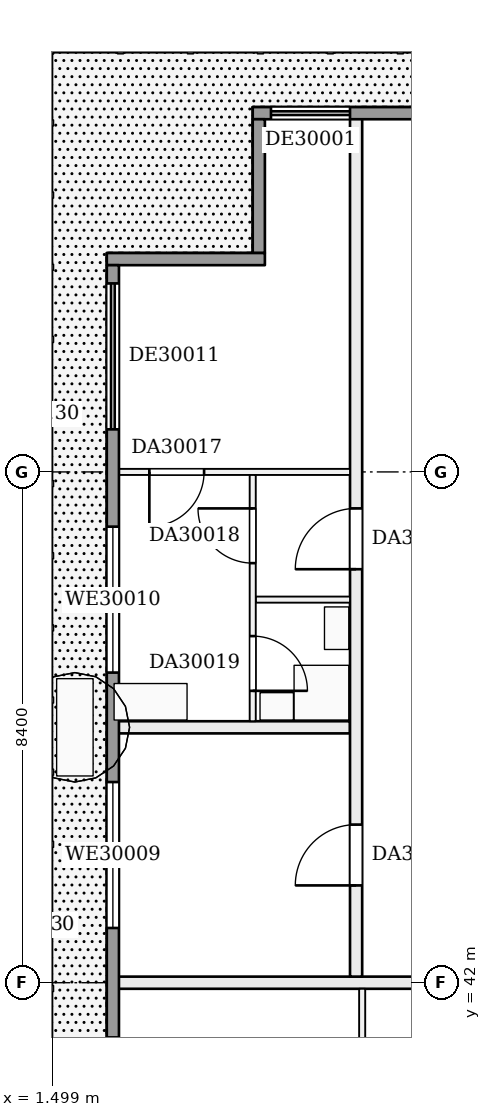
"""IFC4 building model, lengths in metres.
Left out: names, types, materials, properties, quantities, classifications, styles, units other than length and angle.
Written with IfcOpenShell. Run it as: python <this file> out.ifc"""

import sys

from ifc_helpers import new_model, si_unit, direction, frame, frame_2d, origin, place, context, subcontext, project, spatial, rectangle, extrude, element, fill, save


model = new_model("IFC4")
c1 = context("Model", 3, precision=1e-05, world=origin(), true_north=direction((0.0, 1.0)))
c2 = subcontext(c1, "Body", "Model", "MODEL_VIEW")
j1 = project(units=[si_unit("LENGTHUNIT", "METRE"), si_unit("PLANEANGLEUNIT", "RADIAN")], contexts=[c1])
p1 = place(None, origin())
s1 = spatial("IfcSite", under=j1, at=p1, CompositionType="ELEMENT")
p2 = place(p1, origin())
s2 = spatial("IfcBuilding", under=s1, at=p2, CompositionType="ELEMENT")
p3 = place(p2, frame((0.0, 0.0, 119.7)))
s3 = spatial("IfcBuildingStorey", under=s2, at=p3, CompositionType="ELEMENT", Elevation=119.7)
p4 = place(p3, frame((2.5, 42.0, 0.0), z_axis=(0.0, 0.0, 1.0), x_axis=(1.0, 0.0, 0.0)))
e1 = element("IfcWall", 1, at=p4, inside=s3, PredefinedType="PARTITIONING", context=c2, shape_type="SweptSolid", body=[
    extrude(rectangle(XDim=5.9, YDim=0.2, at=frame_2d((2.95, 0.0))), origin(), (0.0, 0.0, 1.0), 3.22),
])
p5 = place(p3, frame((2.5, 46.2, 0.0), z_axis=(0.0, 0.0, 1.0), x_axis=(1.0, 0.0, 0.0)))
e2 = element("IfcWall", 2, at=p5, inside=s3, PredefinedType="PARTITIONING", context=c2, shape_type="SweptSolid", body=[
    extrude(rectangle(XDim=3.9, YDim=0.2, at=frame_2d((1.95, 0.0))), origin(), (0.0, 0.0, 1.0), 3.22),
])
p6 = place(p3, frame((4.85, 48.3, 0.0), z_axis=(0.0, 0.0, 1.0), x_axis=(1.0, 0.0, 0.0)))
e3 = element("IfcWall", 3, at=p6, inside=s3, PredefinedType="PARTITIONING", context=c2, shape_type="SweptSolid", body=[
    extrude(rectangle(XDim=1.55, YDim=0.1, at=frame_2d((0.775, 0.0))), origin(), (0.0, 0.0, 1.0), 3.22),
])
p7 = place(p3, frame((2.5, 50.4, 0.0), z_axis=(0.0, 0.0, 1.0), x_axis=(1.0, 0.0, 0.0)))
e4 = element("IfcWall", 4, at=p7, inside=s3, PredefinedType="PARTITIONING", context=c2, shape_type="SweptSolid", body=[
    extrude(rectangle(XDim=3.9, YDim=0.1, at=frame_2d((1.95, 0.0))), origin(), (0.0, 0.0, 1.0), 3.22),
])
p8 = place(p7, frame((0.6, 0.0, 0.0)))
e5 = element("IfcOpeningElement", 5, at=p8, cuts=e4, PredefinedType="OPENING", context=c2, shape_type="SweptSolid", body=[
    extrude(rectangle(XDim=0.9, YDim=2.1, at=frame_2d((0.45, 1.05))), frame((0.0, 0.06, 0.0), z_axis=(0.0, -1.0, 0.0), x_axis=(1.0, 0.0, 0.0)), (0.0, 0.0, 1.0), 0.12),
])
p9 = place(p3, frame((4.8, 46.3, 0.0), z_axis=(0.0, 0.0, 1.0), x_axis=(0.0, 1.0, 0.0)))
e6 = element("IfcWall", 6, at=p9, inside=s3, PredefinedType="PARTITIONING", context=c2, shape_type="SweptSolid", body=[
    extrude(rectangle(XDim=4.05, YDim=0.1, at=frame_2d((2.025, 0.0))), origin(), (0.0, 0.0, 1.0), 3.22),
])
p10 = place(p9, frame((2.6, 0.0, 0.0)))
e7 = element("IfcOpeningElement", 7, at=p10, cuts=e6, PredefinedType="OPENING", context=c2, shape_type="SweptSolid", body=[
    extrude(rectangle(XDim=0.9, YDim=2.1, at=frame_2d((0.45, 1.05))), frame((0.0, 0.06, 0.0), z_axis=(0.0, -1.0, 0.0), x_axis=(1.0, 0.0, 0.0)), (0.0, 0.0, 1.0), 0.12),
])
p11 = place(p9, frame((0.5, 0.0, 0.0)))
e8 = element("IfcOpeningElement", 8, at=p11, cuts=e6, PredefinedType="OPENING", context=c2, shape_type="SweptSolid", body=[
    extrude(rectangle(XDim=0.9, YDim=2.1, at=frame_2d((0.45, 1.05))), frame((0.0, 0.06, 0.0), z_axis=(0.0, -1.0, 0.0), x_axis=(1.0, 0.0, 0.0)), (0.0, 0.0, 1.0), 0.12),
])
p12 = place(p3, frame((6.5, 42.1, 0.0), z_axis=(0.0, 0.0, 1.0), x_axis=(0.0, 1.0, 0.0)))
e9 = element("IfcWall", 9, at=p12, inside=s3, PredefinedType="PARTITIONING", context=c2, shape_type="SweptSolid", body=[
    extrude(rectangle(XDim=14.2, YDim=0.2, at=frame_2d((7.1, 0.0))), origin(), (0.0, 0.0, 1.0), 3.22),
])
p13 = place(p12, frame((1.5, 0.0, 0.0)))
e10 = element("IfcOpeningElement", 10, at=p13, cuts=e9, PredefinedType="OPENING", context=c2, shape_type="SweptSolid", body=[
    extrude(rectangle(XDim=1.0, YDim=2.1, at=frame_2d((0.5, 1.05))), frame((0.0, 0.11, 0.0), z_axis=(0.0, -1.0, 0.0), x_axis=(1.0, 0.0, 0.0)), (0.0, 0.0, 1.0), 0.22),
])
p14 = place(p12, frame((6.7, 0.0, 0.0)))
e11 = element("IfcOpeningElement", 11, at=p14, cuts=e9, PredefinedType="OPENING", context=c2, shape_type="SweptSolid", body=[
    extrude(rectangle(XDim=1.0, YDim=2.1, at=frame_2d((0.5, 1.05))), frame((0.0, 0.11, 0.0), z_axis=(0.0, -1.0, 0.0), x_axis=(1.0, 0.0, 0.0)), (0.0, 0.0, 1.0), 0.22),
])
p15 = place(p3, frame((6.6, 16.85, 0.0), z_axis=(0.0, 0.0, 1.0), x_axis=(0.0, 1.0, 0.0)))
e12 = element("IfcWall", 12, at=p15, inside=s3, PredefinedType="PARTITIONING", context=c2, shape_type="SweptSolid", body=[
    extrude(rectangle(XDim=25.05, YDim=0.1, at=frame_2d((12.525, 0.0))), origin(), (0.0, 0.0, 1.0), 3.22),
])
p16 = place(p15, frame((1.55, 0.0, 0.0)))
e13 = element("IfcOpeningElement", 13, at=p16, cuts=e12, PredefinedType="OPENING", context=c2, shape_type="SweptSolid", body=[
    extrude(rectangle(XDim=0.9, YDim=2.1, at=frame_2d((0.45, 1.05))), frame((0.0, 0.06, 0.0), z_axis=(0.0, -1.0, 0.0), x_axis=(1.0, 0.0, 0.0)), (0.0, 0.0, 1.0), 0.12),
])
p17 = place(p15, frame((7.15, 0.0, 0.0)))
e14 = element("IfcOpeningElement", 14, at=p17, cuts=e12, PredefinedType="OPENING", context=c2, shape_type="SweptSolid", body=[
    extrude(rectangle(XDim=0.9, YDim=2.1, at=frame_2d((0.45, 1.05))), frame((0.0, 0.06, 0.0), z_axis=(0.0, -1.0, 0.0), x_axis=(1.0, 0.0, 0.0)), (0.0, 0.0, 1.0), 0.12),
])
p18 = place(p15, frame((14.15, 0.0, 0.0)))
e15 = element("IfcOpeningElement", 15, at=p18, cuts=e12, PredefinedType="OPENING", context=c2, shape_type="SweptSolid", body=[
    extrude(rectangle(XDim=0.9, YDim=2.1, at=frame_2d((0.45, 1.05))), frame((0.0, 0.06, 0.0), z_axis=(0.0, -1.0, 0.0), x_axis=(1.0, 0.0, 0.0)), (0.0, 0.0, 1.0), 0.12),
])
p19 = place(p15, frame((18.35, 0.0, 0.0)))
e16 = element("IfcOpeningElement", 16, at=p19, cuts=e12, PredefinedType="OPENING", context=c2, shape_type="SweptSolid", body=[
    extrude(rectangle(XDim=0.9, YDim=2.1, at=frame_2d((0.45, 1.05))), frame((0.0, 0.06, 0.0), z_axis=(0.0, -1.0, 0.0), x_axis=(1.0, 0.0, 0.0)), (0.0, 0.0, 1.0), 0.12),
])
p20 = place(p15, frame((22.55, 0.0, 0.0)))
e17 = element("IfcOpeningElement", 17, at=p20, cuts=e12, PredefinedType="OPENING", context=c2, shape_type="SweptSolid", body=[
    extrude(rectangle(XDim=0.9, YDim=2.1, at=frame_2d((0.45, 1.05))), frame((0.0, 0.06, 0.0), z_axis=(0.0, -1.0, 0.0), x_axis=(1.0, 0.0, 0.0)), (0.0, 0.0, 1.0), 0.12),
])
p21 = place(p3, frame((8.4, 56.3, 0.0), z_axis=(0.0, 0.0, 1.0), x_axis=(-1.0, 0.0, 0.0)))
e18 = element("IfcWall", 18, at=p21, inside=s3, PredefinedType="SOLIDWALL", context=c2, shape_type="SweptSolid", body=[
    extrude(rectangle(XDim=3.6, YDim=0.2, at=frame_2d((1.8, 0.0))), origin(), (0.0, 0.0, 1.0), 3.22),
])
p22 = place(p21, frame((2.0, 0.0, 0.0)))
e19 = element("IfcOpeningElement", 19, at=p22, cuts=e18, PredefinedType="OPENING", context=c2, shape_type="SweptSolid", body=[
    extrude(rectangle(XDim=1.3, YDim=2.2, at=frame_2d((0.65, 1.1))), frame((0.0, 0.11, 0.0), z_axis=(0.0, -1.0, 0.0), x_axis=(1.0, 0.0, 0.0)), (0.0, 0.0, 1.0), 0.22),
])
p23 = place(p3, frame((4.9, 56.2, 0.0), z_axis=(0.0, 0.0, 1.0), x_axis=(0.0, -1.0, 0.0)))
e20 = element("IfcWall", 20, at=p23, inside=s3, PredefinedType="SOLIDWALL", context=c2, shape_type="SweptSolid", body=[
    extrude(rectangle(XDim=2.2, YDim=0.2, at=frame_2d((1.1, 0.0))), origin(), (0.0, 0.0, 1.0), 3.22),
])
p24 = place(p3, frame((5.0, 53.9, 0.0), z_axis=(0.0, 0.0, 1.0), x_axis=(-1.0, 0.0, 0.0)))
e21 = element("IfcWall", 21, at=p24, inside=s3, PredefinedType="SOLIDWALL", context=c2, shape_type="SweptSolid", body=[
    extrude(rectangle(XDim=2.6, YDim=0.2, at=frame_2d((1.3, 0.0))), origin(), (0.0, 0.0, 1.0), 3.22),
])
p25 = place(p3, frame((2.5, 53.8, 0.0), z_axis=(0.0, 0.0, 1.0), x_axis=(0.0, -1.0, 0.0)))
e22 = element("IfcWall", 22, at=p25, inside=s3, PredefinedType="SOLIDWALL", context=c2, shape_type="SweptSolid", body=[
    extrude(rectangle(XDim=40.4, YDim=0.2, at=frame_2d((20.2, 0.0))), origin(), (0.0, 0.0, 1.0), 3.22),
])
p26 = place(p25, frame((37.7, 0.0, 0.9)))
e23 = element("IfcOpeningElement", 23, at=p26, cuts=e22, PredefinedType="OPENING", context=c2, shape_type="SweptSolid", body=[
    extrude(rectangle(XDim=2.4, YDim=1.5, at=frame_2d((1.2, 0.75))), frame((0.0, 0.11, 0.0), z_axis=(0.0, -1.0, 0.0), x_axis=(1.0, 0.0, 0.0)), (0.0, 0.0, 1.0), 0.22),
])
p27 = place(p25, frame((33.7, 0.0, 0.9)))
e24 = element("IfcOpeningElement", 24, at=p27, cuts=e22, PredefinedType="OPENING", context=c2, shape_type="SweptSolid", body=[
    extrude(rectangle(XDim=2.4, YDim=1.5, at=frame_2d((1.2, 0.75))), frame((0.0, 0.11, 0.0), z_axis=(0.0, -1.0, 0.0), x_axis=(1.0, 0.0, 0.0)), (0.0, 0.0, 1.0), 0.22),
])
p28 = place(p25, frame((29.5, 0.0, 0.0)))
e25 = element("IfcOpeningElement", 25, at=p28, cuts=e22, PredefinedType="OPENING", context=c2, shape_type="SweptSolid", body=[
    extrude(rectangle(XDim=2.4, YDim=2.2, at=frame_2d((1.2, 1.1))), frame((0.0, 0.11, 0.0), z_axis=(0.0, -1.0, 0.0), x_axis=(1.0, 0.0, 0.0)), (0.0, 0.0, 1.0), 0.22),
])
p29 = place(p25, frame((25.3, 0.0, 0.0)))
e26 = element("IfcOpeningElement", 26, at=p29, cuts=e22, PredefinedType="OPENING", context=c2, shape_type="SweptSolid", body=[
    extrude(rectangle(XDim=2.4, YDim=2.2, at=frame_2d((1.2, 1.1))), frame((0.0, 0.11, 0.0), z_axis=(0.0, -1.0, 0.0), x_axis=(1.0, 0.0, 0.0)), (0.0, 0.0, 1.0), 0.22),
])
p30 = place(p25, frame((21.1, 0.0, 0.9)))
e27 = element("IfcOpeningElement", 27, at=p30, cuts=e22, PredefinedType="OPENING", context=c2, shape_type="SweptSolid", body=[
    extrude(rectangle(XDim=2.4, YDim=1.5, at=frame_2d((1.2, 0.75))), frame((0.0, 0.11, 0.0), z_axis=(0.0, -1.0, 0.0), x_axis=(1.0, 0.0, 0.0)), (0.0, 0.0, 1.0), 0.22),
])
p31 = place(p25, frame((16.9, 0.0, 0.9)))
e28 = element("IfcOpeningElement", 28, at=p31, cuts=e22, PredefinedType="OPENING", context=c2, shape_type="SweptSolid", body=[
    extrude(rectangle(XDim=2.4, YDim=1.5, at=frame_2d((1.2, 0.75))), frame((0.0, 0.11, 0.0), z_axis=(0.0, -1.0, 0.0), x_axis=(1.0, 0.0, 0.0)), (0.0, 0.0, 1.0), 0.22),
])
p32 = place(p25, frame((12.7, 0.0, 0.9)))
e29 = element("IfcOpeningElement", 29, at=p32, cuts=e22, PredefinedType="OPENING", context=c2, shape_type="SweptSolid", body=[
    extrude(rectangle(XDim=2.4, YDim=1.5, at=frame_2d((1.2, 0.75))), frame((0.0, 0.11, 0.0), z_axis=(0.0, -1.0, 0.0), x_axis=(1.0, 0.0, 0.0)), (0.0, 0.0, 1.0), 0.22),
])
p33 = place(p25, frame((8.5, 0.0, 0.9)))
e30 = element("IfcOpeningElement", 30, at=p33, cuts=e22, PredefinedType="OPENING", context=c2, shape_type="SweptSolid", body=[
    extrude(rectangle(XDim=2.4, YDim=1.5, at=frame_2d((1.2, 0.75))), frame((0.0, 0.11, 0.0), z_axis=(0.0, -1.0, 0.0), x_axis=(1.0, 0.0, 0.0)), (0.0, 0.0, 1.0), 0.22),
])
p34 = place(p25, frame((4.3, 0.0, 0.9)))
e31 = element("IfcOpeningElement", 31, at=p34, cuts=e22, PredefinedType="OPENING", context=c2, shape_type="SweptSolid", body=[
    extrude(rectangle(XDim=2.4, YDim=1.5, at=frame_2d((1.2, 0.75))), frame((0.0, 0.11, 0.0), z_axis=(0.0, -1.0, 0.0), x_axis=(1.0, 0.0, 0.0)), (0.0, 0.0, 1.0), 0.22),
])
p35 = place(p25, frame((0.3, 0.0, 0.0)))
e32 = element("IfcOpeningElement", 32, at=p35, cuts=e22, PredefinedType="OPENING", context=c2, shape_type="SweptSolid", body=[
    extrude(rectangle(XDim=2.4, YDim=2.2, at=frame_2d((1.2, 1.1))), frame((0.0, 0.11, 0.0), z_axis=(0.0, -1.0, 0.0), x_axis=(1.0, 0.0, 0.0)), (0.0, 0.0, 1.0), 0.22),
])
p36 = place(p8, frame((0.9, 0.0, 0.0), z_axis=(0.0, 0.0, 1.0), x_axis=(-1.0, 0.0, 0.0)))
e33 = element("IfcDoor", 33, at=p36, inside=s3, OperationType="SINGLE_SWING_RIGHT", PredefinedType="DOOR", context=c2, shape_type="SweptSolid", body=[
    extrude(rectangle(XDim=0.9, YDim=2.1, at=frame_2d((0.45, 1.05))), frame((0.0, 0.025, 0.0), z_axis=(0.0, -1.0, 0.0), x_axis=(1.0, 0.0, 0.0)), (0.0, 0.0, 1.0), 0.05),
])
fill(e5, e33)
p37 = place(p10, origin())
e34 = element("IfcDoor", 34, at=p37, inside=s3, OperationType="SINGLE_SWING_RIGHT", PredefinedType="DOOR", context=c2, shape_type="SweptSolid", body=[
    extrude(rectangle(XDim=0.9, YDim=2.1, at=frame_2d((0.45, 1.05))), frame((0.0, 0.025, 0.0), z_axis=(0.0, -1.0, 0.0), x_axis=(1.0, 0.0, 0.0)), (0.0, 0.0, 1.0), 0.05),
])
fill(e7, e34)
p38 = place(p11, frame((0.9, 0.0, 0.0), z_axis=(0.0, 0.0, 1.0), x_axis=(-1.0, 0.0, 0.0)))
e35 = element("IfcDoor", 35, at=p38, inside=s3, OperationType="SINGLE_SWING_RIGHT", PredefinedType="DOOR", context=c2, shape_type="SweptSolid", body=[
    extrude(rectangle(XDim=0.9, YDim=2.1, at=frame_2d((0.45, 1.05))), frame((0.0, 0.025, 0.0), z_axis=(0.0, -1.0, 0.0), x_axis=(1.0, 0.0, 0.0)), (0.0, 0.0, 1.0), 0.05),
])
fill(e8, e35)
p39 = place(p13, origin())
e36 = element("IfcDoor", 36, at=p39, inside=s3, OperationType="SINGLE_SWING_LEFT", PredefinedType="DOOR", context=c2, shape_type="SweptSolid", body=[
    extrude(rectangle(XDim=1.0, YDim=2.1, at=frame_2d((0.5, 1.05))), frame((0.0, 0.025, 0.0), z_axis=(0.0, -1.0, 0.0), x_axis=(1.0, 0.0, 0.0)), (0.0, 0.0, 1.0), 0.05),
])
fill(e10, e36)
p40 = place(p14, origin())
e37 = element("IfcDoor", 37, at=p40, inside=s3, OperationType="SINGLE_SWING_LEFT", PredefinedType="DOOR", context=c2, shape_type="SweptSolid", body=[
    extrude(rectangle(XDim=1.0, YDim=2.1, at=frame_2d((0.5, 1.05))), frame((0.0, 0.025, 0.0), z_axis=(0.0, -1.0, 0.0), x_axis=(1.0, 0.0, 0.0)), (0.0, 0.0, 1.0), 0.05),
])
fill(e11, e37)
p41 = place(p22, origin())
e38 = element("IfcDoor", 38, at=p41, inside=s3, OperationType="DOUBLE_DOOR_SLIDING", PredefinedType="DOOR", context=c2, shape_type="SweptSolid", body=[
    extrude(rectangle(XDim=1.3, YDim=2.2, at=frame_2d((0.65, 1.1))), frame((0.0, 0.025, 0.0), z_axis=(0.0, -1.0, 0.0), x_axis=(1.0, 0.0, 0.0)), (0.0, 0.0, 1.0), 0.05),
])
fill(e19, e38)
p42 = place(p33, origin())
e39 = element("IfcWindow", 39, at=p42, inside=s3, PartitioningType="SINGLE_PANEL", PredefinedType="WINDOW", context=c2, shape_type="SweptSolid", body=[
    extrude(rectangle(XDim=2.4, YDim=1.5, at=frame_2d((1.2, 0.75))), frame((0.0, 0.03, 0.0), z_axis=(0.0, -1.0, 0.0), x_axis=(1.0, 0.0, 0.0)), (0.0, 0.0, 1.0), 0.06),
])
fill(e30, e39)
p43 = place(p34, origin())
e40 = element("IfcWindow", 40, at=p43, inside=s3, PartitioningType="SINGLE_PANEL", PredefinedType="WINDOW", context=c2, shape_type="SweptSolid", body=[
    extrude(rectangle(XDim=2.4, YDim=1.5, at=frame_2d((1.2, 0.75))), frame((0.0, 0.03, 0.0), z_axis=(0.0, -1.0, 0.0), x_axis=(1.0, 0.0, 0.0)), (0.0, 0.0, 1.0), 0.06),
])
fill(e31, e40)
p44 = place(p35, origin())
e41 = element("IfcDoor", 41, at=p44, inside=s3, OperationType="DOUBLE_DOOR_SLIDING", PredefinedType="DOOR", context=c2, shape_type="SweptSolid", body=[
    extrude(rectangle(XDim=2.4, YDim=2.2, at=frame_2d((1.2, 1.1))), frame((0.0, 0.025, 0.0), z_axis=(0.0, -1.0, 0.0), x_axis=(1.0, 0.0, 0.0)), (0.0, 0.0, 1.0), 0.05),
])
fill(e32, e41)
save(model, sys.argv[1])
